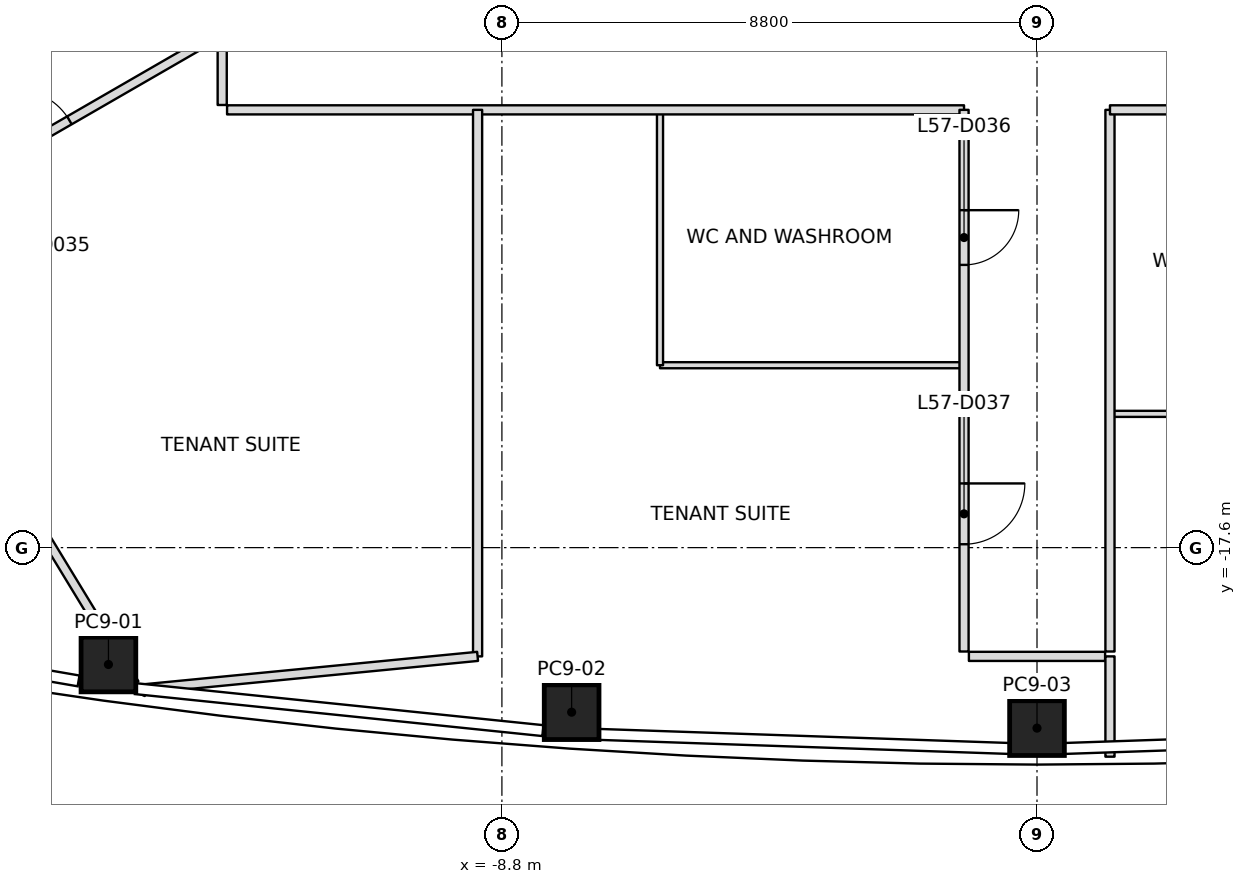
"""IFC4 building model, lengths in metres.
Left out: names, types, materials, properties, quantities, classifications, styles, units other than length and angle.
Written with IfcOpenShell. Run it as: python <this file> out.ifc"""

import sys

from ifc_helpers import new_model, si_unit, direction, frame, frame_2d, origin, origin_2d, place, context, subcontext, project, spatial, rectangle, extrude, element, fill, save


model = new_model("IFC4")
c1 = context("Model", 3, precision=1e-05, world=origin(), true_north=direction((0.0, 1.0)))
c2 = subcontext(c1, "Body", "Model", "MODEL_VIEW")
j1 = project(units=[si_unit("LENGTHUNIT", "METRE"), si_unit("PLANEANGLEUNIT", "RADIAN")], contexts=[c1])
p1 = place(None, origin())
s1 = spatial("IfcSite", under=j1, at=p1, CompositionType="ELEMENT")
p2 = place(p1, origin())
s2 = spatial("IfcBuilding", under=s1, at=p2, CompositionType="ELEMENT")
p3 = place(p2, frame((0.0, 0.0, 255.0)))
s3 = spatial("IfcBuildingStorey", under=s2, at=p3, CompositionType="ELEMENT", Elevation=255.0)
p4 = place(p3, frame((-15.271, -19.522, 0.0), z_axis=(0.017513460473, 0.010373826761, 0.999792809746), x_axis=(-0.990498056196, 0.13660062704, 0.015933278536)))
e1 = element("IfcColumn", 1, at=p4, inside=s3, PredefinedType="COLUMN", context=c2, shape_type="SweptSolid", body=[
    extrude(rectangle(XDim=0.9, YDim=0.9, at=origin_2d()), origin(), (0.0, 0.0, 1.0), 4.001),
])
p5 = place(p3, frame((-7.653, -20.307, 0.0), z_axis=(0.008727150594, 0.011168311599, 0.999899547784), x_axis=(-0.9976217671, 0.068466969999, 0.007942532787)))
e2 = element("IfcColumn", 2, at=p5, inside=s3, PredefinedType="COLUMN", context=c2, shape_type="SweptSolid", body=[
    extrude(rectangle(XDim=0.9, YDim=0.9, at=origin_2d()), origin(), (0.0, 0.0, 1.0), 4.0),
])
p6 = place(p3, frame((0.0, -20.569, 0.0), z_axis=(0.0, 0.01141283087, 0.999934871525), x_axis=(1.0, 0.0, 0.0)))
e3 = element("IfcColumn", 3, at=p6, inside=s3, PredefinedType="COLUMN", context=c2, shape_type="SweptSolid", body=[
    extrude(rectangle(XDim=0.9, YDim=0.9, at=origin_2d()), origin(), (0.0, 0.0, 1.0), 4.0),
])
p7 = place(p3, frame((-19.291, -12.523, 0.0), z_axis=(0.0, 0.0, 1.0), x_axis=(0.519733387124, -0.854328511937, 0.0)))
e4 = element("IfcWall", 4, at=p7, inside=s3, PredefinedType="PARTITIONING", context=c2, shape_type="SweptSolid", body=[
    extrude(rectangle(XDim=8.56, YDim=0.15, at=frame_2d((4.28, 0.0))), origin(), (0.0, 0.0, 1.0), 3.3),
])
p8 = place(p3, frame((-9.2, -10.4, 0.0), z_axis=(0.0, 0.0, 1.0), x_axis=(0.0, -1.0, 0.0)))
e5 = element("IfcWall", 5, at=p8, inside=s3, PredefinedType="PARTITIONING", context=c2, shape_type="SweptSolid", body=[
    extrude(rectangle(XDim=8.989, YDim=0.15, at=frame_2d((4.494, 0.0))), origin(), (0.0, 0.0, 1.0), 3.3),
])
p9 = place(p3, frame((-9.2, -19.389, 0.0), z_axis=(0.0, 0.0, 1.0), x_axis=(-0.995304202409, -0.096796408342, 0.0)))
e6 = element("IfcWall", 6, at=p9, inside=s3, PredefinedType="PARTITIONING", context=c2, shape_type="SweptSolid", body=[
    extrude(rectangle(XDim=5.519, YDim=0.15, at=frame_2d((2.759, 0.0))), origin(), (0.0, 0.0, 1.0), 3.234),
])
p10 = place(p3, frame((-14.743, -20.01, 0.0), z_axis=(0.0, 0.0, 1.0), x_axis=(0.418254272616, 0.908329985984, 0.0)))
e7 = element("IfcWall", 7, at=p10, inside=s3, PredefinedType="PARTITIONING", context=c2, shape_type="SweptSolid", body=[
    extrude(rectangle(XDim=0.115, YDim=0.15, at=frame_2d((0.058, 0.0))), origin(), (0.0, 0.0, 1.0), 3.3),
])
p11 = place(p3, frame((1.2, -19.389, 0.0), z_axis=(0.0, 0.0, 1.0), x_axis=(0.0, -1.0, 0.0)))
e8 = element("IfcWall", 8, at=p11, inside=s3, PredefinedType="PARTITIONING", context=c2, shape_type="SweptSolid", body=[
    extrude(rectangle(XDim=1.65, YDim=0.15, at=frame_2d((0.825, 0.0))), origin(), (0.0, 0.0, 1.0), 3.084),
])
p12 = place(p3, frame((-13.4, -6.351, 0.0), z_axis=(0.0, 0.0, 1.0), x_axis=(-0.866035161949, -0.499983097982, 0.0)))
e9 = element("IfcWall", 9, at=p12, inside=s3, PredefinedType="PARTITIONING", context=c2, shape_type="SweptSolid", body=[
    extrude(rectangle(XDim=8.108, YDim=0.15, at=frame_2d((4.054, 0.0))), origin(), (0.0, 0.0, 1.0), 3.3),
])
p13 = place(p12, frame((1.35, 0.0, 0.0)))
e10 = element("IfcOpeningElement", 10, at=p13, cuts=e9, PredefinedType="OPENING", context=c2, shape_type="SweptSolid", body=[
    extrude(rectangle(XDim=0.9, YDim=2.1, at=frame_2d((0.45, 1.05))), frame((0.0, 0.075, 0.0), z_axis=(0.0, -1.0, 0.0), x_axis=(1.0, 0.0, 0.0)), (0.0, 0.0, 1.0), 0.15),
])
p14 = place(p12, frame((5.444, 0.0, 0.0)))
e11 = element("IfcOpeningElement", 11, at=p14, cuts=e9, PredefinedType="OPENING", context=c2, shape_type="SweptSolid", body=[
    extrude(rectangle(XDim=1.0, YDim=2.1, at=frame_2d((0.5, 1.05))), frame((0.0, 0.075, 0.0), z_axis=(0.0, -1.0, 0.0), x_axis=(1.0, 0.0, 0.0)), (0.0, 0.0, 1.0), 0.15),
])
p15 = place(p3, frame((-19.222, -12.483, 0.0), z_axis=(0.0, 0.0, 1.0), x_axis=(0.866026533947, 0.499998042495, 0.0)))
e12 = element("IfcWall", 12, at=p15, inside=s3, PredefinedType="PARTITIONING", context=c2, shape_type="SweptSolid", body=[
    extrude(rectangle(XDim=6.723, YDim=0.15, at=frame_2d((3.361, 0.0))), origin(), (0.0, 0.0, 1.0), 3.233),
])
p16 = place(p15, frame((2.821, 0.0, 0.0)))
e13 = element("IfcOpeningElement", 13, at=p16, cuts=e12, PredefinedType="OPENING", context=c2, shape_type="SweptSolid", body=[
    extrude(rectangle(XDim=1.0, YDim=2.1, at=frame_2d((0.5, 1.05))), frame((0.0, 0.075, 0.0), z_axis=(0.0, -1.0, 0.0), x_axis=(1.0, 0.0, 0.0)), (0.0, 0.0, 1.0), 0.15),
])
p17 = place(p3, frame((-13.4, -9.214, 0.0), z_axis=(0.0, 0.0, 1.0), x_axis=(0.0, -1.0, 0.0)))
e14 = element("IfcWall", 14, at=p17, inside=s3, PredefinedType="PARTITIONING", context=c2, shape_type="SweptSolid", body=[
    extrude(rectangle(XDim=1.106, YDim=0.15, at=frame_2d((0.553, 0.0))), origin(), (0.0, 0.0, 1.0), 3.233),
])
p18 = place(p3, frame((-13.32, -10.4, 0.0), z_axis=(0.0, 0.0, 1.0), x_axis=(1.0, 0.0, 0.0)))
e15 = element("IfcWall", 15, at=p18, inside=s3, PredefinedType="PARTITIONING", context=c2, shape_type="SweptSolid", body=[
    extrude(rectangle(XDim=12.12, YDim=0.15, at=frame_2d((6.06, 0.0))), origin(), (0.0, 0.0, 1.0), 3.167),
])
p19 = place(p3, frame((-1.2, -10.4, 0.0), z_axis=(0.0, 0.0, 1.0), x_axis=(0.0, -1.0, 0.0)))
e16 = element("IfcWall", 16, at=p19, inside=s3, PredefinedType="PARTITIONING", context=c2, shape_type="SweptSolid", body=[
    extrude(rectangle(XDim=8.909, YDim=0.15, at=frame_2d((4.454, 0.0))), origin(), (0.0, 0.0, 1.0), 3.3),
])
p20 = place(p19, frame((1.65, 0.0, 0.0)))
e17 = element("IfcOpeningElement", 17, at=p20, cuts=e16, PredefinedType="OPENING", context=c2, shape_type="SweptSolid", body=[
    extrude(rectangle(XDim=0.9, YDim=2.1, at=frame_2d((0.45, 1.05))), frame((0.0, 0.075, 0.0), z_axis=(0.0, -1.0, 0.0), x_axis=(1.0, 0.0, 0.0)), (0.0, 0.0, 1.0), 0.15),
])
p21 = place(p19, frame((6.144, 0.0, 0.0)))
e18 = element("IfcOpeningElement", 18, at=p21, cuts=e16, PredefinedType="OPENING", context=c2, shape_type="SweptSolid", body=[
    extrude(rectangle(XDim=1.0, YDim=2.1, at=frame_2d((0.5, 1.05))), frame((0.0, 0.075, 0.0), z_axis=(0.0, -1.0, 0.0), x_axis=(1.0, 0.0, 0.0)), (0.0, 0.0, 1.0), 0.15),
])
p22 = place(p3, frame((-1.12, -19.389, 0.0), z_axis=(0.0, 0.0, 1.0), x_axis=(1.0, 0.0, 0.0)))
e19 = element("IfcWall", 19, at=p22, inside=s3, PredefinedType="PARTITIONING", context=c2, shape_type="SweptSolid", body=[
    extrude(rectangle(XDim=2.24, YDim=0.15, at=frame_2d((1.12, 0.0))), origin(), (0.0, 0.0, 1.0), 3.3),
])
p23 = place(p3, frame((1.2, -19.309, 0.0), z_axis=(0.0, 0.0, 1.0), x_axis=(0.0, 1.0, 0.0)))
e20 = element("IfcWall", 20, at=p23, inside=s3, PredefinedType="PARTITIONING", context=c2, shape_type="SweptSolid", body=[
    extrude(rectangle(XDim=8.909, YDim=0.15, at=frame_2d((4.454, 0.0))), origin(), (0.0, 0.0, 1.0), 3.3),
])
p24 = place(p3, frame((1.2, -10.4, 0.0), z_axis=(0.0, 0.0, 1.0), x_axis=(1.0, 0.0, 0.0)))
e21 = element("IfcWall", 21, at=p24, inside=s3, PredefinedType="PARTITIONING", context=c2, shape_type="SweptSolid", body=[
    extrude(rectangle(XDim=12.12, YDim=0.15, at=frame_2d((6.06, 0.0))), origin(), (0.0, 0.0, 1.0), 3.167),
])
p25 = place(p24, frame((1.65, 0.0, 0.0)))
e22 = element("IfcOpeningElement", 22, at=p25, cuts=e21, PredefinedType="OPENING", context=c2, shape_type="SweptSolid", body=[
    extrude(rectangle(XDim=0.9, YDim=2.1, at=frame_2d((0.45, 1.05))), frame((0.0, 0.075, 0.0), z_axis=(0.0, -1.0, 0.0), x_axis=(1.0, 0.0, 0.0)), (0.0, 0.0, 1.0), 0.15),
])
p26 = place(p24, frame((7.75, 0.0, 0.0)))
e23 = element("IfcOpeningElement", 23, at=p26, cuts=e21, PredefinedType="OPENING", context=c2, shape_type="SweptSolid", body=[
    extrude(rectangle(XDim=1.0, YDim=2.1, at=frame_2d((0.5, 1.05))), frame((0.0, 0.075, 0.0), z_axis=(0.0, -1.0, 0.0), x_axis=(1.0, 0.0, 0.0)), (0.0, 0.0, 1.0), 0.15),
])
p27 = place(p3, frame((-1.23, -14.6, 0.0), z_axis=(0.0, 0.0, 1.0), x_axis=(-1.0, 0.0, 0.0)))
e24 = element("IfcWall", 24, at=p27, inside=s3, PredefinedType="PARTITIONING", context=c2, shape_type="SweptSolid", body=[
    extrude(rectangle(XDim=4.97, YDim=0.1, at=frame_2d((2.485, 0.0))), origin(), (0.0, 0.0, 1.0), 3.167),
])
p28 = place(p3, frame((-6.2, -14.6, 0.0), z_axis=(0.0, 0.0, 1.0), x_axis=(0.0, 1.0, 0.0)))
e25 = element("IfcWall", 25, at=p28, inside=s3, PredefinedType="PARTITIONING", context=c2, shape_type="SweptSolid", body=[
    extrude(rectangle(XDim=4.17, YDim=0.1, at=frame_2d((2.085, 0.0))), origin(), (0.0, 0.0, 1.0), 3.3),
])
p29 = place(p3, frame((5.4, -15.4, 0.0), z_axis=(0.0, 0.0, 1.0), x_axis=(-1.0, 0.0, 0.0)))
e26 = element("IfcWall", 26, at=p29, inside=s3, PredefinedType="PARTITIONING", context=c2, shape_type="SweptSolid", body=[
    extrude(rectangle(XDim=4.17, YDim=0.1, at=frame_2d((2.085, 0.0))), origin(), (0.0, 0.0, 1.0), 3.167),
])
p30 = place(p16, origin())
e27 = element("IfcDoor", 27, at=p30, inside=s3, OperationType="SINGLE_SWING_LEFT", PredefinedType="DOOR", context=c2, shape_type="SweptSolid", body=[
    extrude(rectangle(XDim=1.0, YDim=2.1, at=frame_2d((0.5, 1.05))), frame((0.0, 0.025, 0.0), z_axis=(0.0, -1.0, 0.0), x_axis=(1.0, 0.0, 0.0)), (0.0, 0.0, 1.0), 0.05),
])
fill(e13, e27)
p31 = place(p20, origin())
e28 = element("IfcDoor", 28, at=p31, inside=s3, OperationType="SINGLE_SWING_LEFT", PredefinedType="DOOR", context=c2, shape_type="SweptSolid", body=[
    extrude(rectangle(XDim=0.9, YDim=2.1, at=frame_2d((0.45, 1.05))), frame((0.0, 0.025, 0.0), z_axis=(0.0, -1.0, 0.0), x_axis=(1.0, 0.0, 0.0)), (0.0, 0.0, 1.0), 0.05),
])
fill(e17, e28)
p32 = place(p21, origin())
e29 = element("IfcDoor", 29, at=p32, inside=s3, OperationType="SINGLE_SWING_RIGHT", PredefinedType="DOOR", context=c2, shape_type="SweptSolid", body=[
    extrude(rectangle(XDim=1.0, YDim=2.1, at=frame_2d((0.5, 1.05))), frame((0.0, 0.025, 0.0), z_axis=(0.0, -1.0, 0.0), x_axis=(1.0, 0.0, 0.0)), (0.0, 0.0, 1.0), 0.05),
])
fill(e18, e29)
save(model, sys.argv[1])
